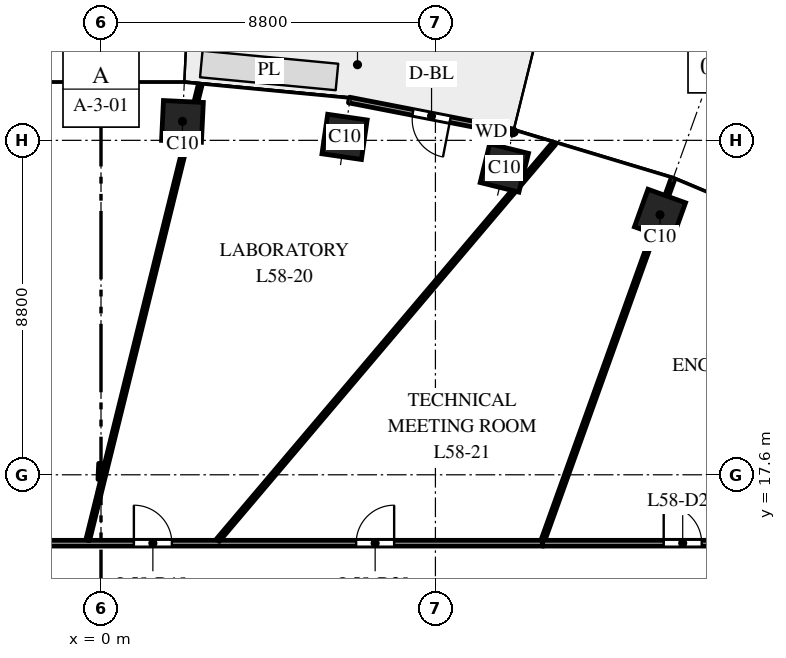
"""IFC4 building model, lengths in metres.
Left out: names, types, materials, properties, quantities, classifications, styles, units other than length and angle.
Written with IfcOpenShell. Run it as: python <this file> out.ifc"""

import sys

from ifc_helpers import new_model, si_unit, direction, frame, frame_2d, origin, origin_2d, place, context, subcontext, project, spatial, rectangle, extrude, element, fill, save


model = new_model("IFC4")
c1 = context("Model", 3, precision=1e-05, world=origin(), true_north=direction((0.0, 1.0)))
c2 = subcontext(c1, "Body", "Model", "MODEL_VIEW")
j1 = project(units=[si_unit("LENGTHUNIT", "METRE"), si_unit("PLANEANGLEUNIT", "RADIAN")], contexts=[c1])
p1 = place(None, origin())
s1 = spatial("IfcSite", under=j1, at=p1, CompositionType="ELEMENT")
p2 = place(p1, origin())
s2 = spatial("IfcBuilding", under=s1, at=p2, CompositionType="ELEMENT")
p3 = place(p2, frame((0.0, 0.0, 273.5)))
s3 = spatial("IfcBuildingStorey", under=s2, at=p3, CompositionType="ELEMENT", Elevation=273.5)
for number, where, z_axis, x_axis in (
    (1, (14.709, 24.441, 0.0), (0.0, 0.0, 1.0), (-0.941, 0.338, 0.0)),
    (2, (10.613, 25.674, 0.0), (0.0, 0.0, 1.0), (-0.971, 0.24, 0.0)),
    (3, (6.409, 26.491, 0.0), (0.0, 0.0, 1.0), (-0.99, 0.143, 0.0)),
    (4, (2.143, 26.898, 0.0), (0.0, 0.0, 1.0), (-0.999, 0.048, 0.0)),
):
    element("IfcColumn", number, at=place(p3, frame(where, z_axis=z_axis, x_axis=x_axis)), inside=s3, PredefinedType="COLUMN", context=c2, shape_type="SweptSolid", body=[
        extrude(rectangle(XDim=1.05, YDim=1.05, at=origin_2d()), origin(), (0.0, 0.0, 1.0), 4.0),
    ])
p4 = place(p3, frame((10.871, 26.617, 0.0), z_axis=(0.0, 0.0, 1.0), x_axis=(-0.981631174778, 0.190788460615, 0.0)))
e5 = element("IfcWall", 5, at=p4, inside=s3, PredefinedType="STANDARD", context=c2, shape_type="SweptSolid", body=[
    extrude(rectangle(XDim=4.426, YDim=0.15, at=frame_2d((2.213, 0.0))), origin(), (0.0, 0.0, 1.0), 3.7),
])
p5 = place(p4, frame((1.713, 0.0, 0.0)))
e6 = element("IfcOpeningElement", 6, at=p5, cuts=e5, PredefinedType="OPENING", context=c2, shape_type="SweptSolid", body=[
    extrude(rectangle(XDim=1.0, YDim=2.4, at=frame_2d((0.5, 1.2))), frame((0.0, 0.085, 0.0), z_axis=(0.0, -1.0, 0.0), x_axis=(1.0, 0.0, 0.0)), (0.0, 0.0, 1.0), 0.17),
])
p6 = place(p3, frame((-8.174, 15.8, 0.0), z_axis=(0.0, 0.0, 1.0), x_axis=(1.0, 0.0, 0.0)))
e7 = element("IfcWall", 7, at=p6, inside=s3, PredefinedType="PARTITIONING", context=c2, shape_type="SweptSolid", body=[
    extrude(rectangle(XDim=19.829, YDim=0.15, at=frame_2d((9.915, 0.0))), origin(), (0.0, 0.0, 1.0), 2.85),
])
p7 = place(p6, frame((3.422, 0.0, 0.0)))
e8 = element("IfcOpeningElement", 8, at=p7, cuts=e7, PredefinedType="OPENING", context=c2, shape_type="SweptSolid", body=[
    extrude(rectangle(XDim=1.0, YDim=2.1, at=frame_2d((0.5, 1.05))), frame((0.0, 0.085, 0.0), z_axis=(0.0, -1.0, 0.0), x_axis=(1.0, 0.0, 0.0)), (0.0, 0.0, 1.0), 0.17),
])
p8 = place(p6, frame((9.039, 0.0, 0.0)))
e9 = element("IfcOpeningElement", 9, at=p8, cuts=e7, PredefinedType="OPENING", context=c2, shape_type="SweptSolid", body=[
    extrude(rectangle(XDim=1.0, YDim=2.1, at=frame_2d((0.5, 1.05))), frame((0.0, 0.085, 0.0), z_axis=(0.0, -1.0, 0.0), x_axis=(1.0, 0.0, 0.0)), (0.0, 0.0, 1.0), 0.17),
])
p9 = place(p6, frame((14.888, 0.0, 0.0)))
e10 = element("IfcOpeningElement", 10, at=p9, cuts=e7, PredefinedType="OPENING", context=c2, shape_type="SweptSolid", body=[
    extrude(rectangle(XDim=1.0, YDim=2.1, at=frame_2d((0.5, 1.05))), frame((0.0, 0.085, 0.0), z_axis=(0.0, -1.0, 0.0), x_axis=(1.0, 0.0, 0.0)), (0.0, 0.0, 1.0), 0.17),
])
p10 = place(p3, frame((-0.35, 15.879, 0.0), z_axis=(0.0, 0.0, 1.0), x_axis=(0.240720113411, 0.970594573959, 0.0)))
e11 = element("IfcWall", 11, at=p10, inside=s3, PredefinedType="PARTITIONING", context=c2, shape_type="SweptSolid", body=[
    extrude(rectangle(XDim=1.234, YDim=0.1, at=frame_2d((0.617, 0.0))), origin(), (0.0, 0.0, 1.0), 3.7),
])
p11 = place(p3, frame((-0.049, 17.097, 0.0), z_axis=(0.0, 0.0, 1.0), x_axis=(0.239793112589, 0.970824012453, 0.0)))
e12 = element("IfcWall", 12, at=p11, inside=s3, PredefinedType="PARTITIONING", context=c2, shape_type="SweptSolid", body=[
    extrude(rectangle(XDim=11.084, YDim=0.1, at=frame_2d((5.542, 0.0))), origin(), (0.0, 0.0, 1.0), 3.0),
])
p12 = place(p3, frame((-0.03, 17.477, 0.0), z_axis=(0.0, 0.0, 1.0), x_axis=(0.045197383952, 0.998978076078, 0.0)))
e13 = element("IfcWall", 13, at=p12, inside=s3, PredefinedType="PARTITIONING", context=c2, shape_type="SweptSolid", body=[
    extrude(rectangle(XDim=0.421, YDim=0.1, at=frame_2d((0.211, 0.0))), origin(), (0.0, 0.0, 1.0), 3.7),
])
p13 = place(p3, frame((3.075, 15.878, 0.0), z_axis=(0.0, 0.0, 1.0), x_axis=(0.64645132614, 0.762955229966, 0.0)))
e14 = element("IfcWall", 14, at=p13, inside=s3, PredefinedType="PARTITIONING", context=c2, shape_type="SweptSolid", body=[
    extrude(rectangle(XDim=13.69, YDim=0.1, at=frame_2d((6.845, 0.0))), origin(), (0.0, 0.0, 1.0), 2.85),
])
p14 = place(p3, frame((11.629, 15.875, 0.0), z_axis=(0.0, 0.0, 1.0), x_axis=(0.338394316696, 0.94100440298, 0.0)))
e15 = element("IfcWall", 15, at=p14, inside=s3, PredefinedType="PARTITIONING", context=c2, shape_type="SweptSolid", body=[
    extrude(rectangle(XDim=10.104, YDim=0.1, at=frame_2d((5.052, 0.0))), origin(), (0.0, 0.0, 1.0), 2.85),
])
p15 = place(p3, frame((11.614, 15.8, 0.0), z_axis=(0.0, 0.0, 1.0), x_axis=(1.0, 0.0, 0.0)))
e16 = element("IfcWall", 16, at=p15, inside=s3, PredefinedType="PARTITIONING", context=c2, shape_type="SweptSolid", body=[
    extrude(rectangle(XDim=16.386, YDim=0.15, at=frame_2d((8.193, 0.0))), origin(), (0.0, 0.0, 1.0), 3.0),
])
p16 = place(p15, frame((3.193, 0.0, 0.0)))
e17 = element("IfcOpeningElement", 17, at=p16, cuts=e16, PredefinedType="OPENING", context=c2, shape_type="SweptSolid", body=[
    extrude(rectangle(XDim=1.0, YDim=2.1, at=frame_2d((0.5, 1.05))), frame((0.0, 0.085, 0.0), z_axis=(0.0, -1.0, 0.0), x_axis=(1.0, 0.0, 0.0)), (0.0, 0.0, 1.0), 0.17),
])
p17 = place(p15, frame((11.486, 0.0, 0.0)))
e18 = element("IfcOpeningElement", 18, at=p17, cuts=e16, PredefinedType="OPENING", context=c2, shape_type="SweptSolid", body=[
    extrude(rectangle(XDim=1.0, YDim=2.1, at=frame_2d((0.5, 1.05))), frame((0.0, 0.085, 0.0), z_axis=(0.0, -1.0, 0.0), x_axis=(1.0, 0.0, 0.0)), (0.0, 0.0, 1.0), 0.17),
])
p18 = place(p5, origin())
e19 = element("IfcDoor", 19, at=p18, inside=s3, OperationType="SINGLE_SWING_LEFT", PredefinedType="DOOR", context=c2, shape_type="SweptSolid", body=[
    extrude(rectangle(XDim=1.0, YDim=2.4, at=frame_2d((0.5, 1.2))), frame((0.0, 0.025, 0.0), z_axis=(0.0, -1.0, 0.0), x_axis=(1.0, 0.0, 0.0)), (0.0, 0.0, 1.0), 0.05),
])
fill(e6, e19)
p19 = place(p8, origin())
e20 = element("IfcDoor", 20, at=p19, inside=s3, OperationType="SINGLE_SWING_LEFT", PredefinedType="DOOR", context=c2, shape_type="SweptSolid", body=[
    extrude(rectangle(XDim=1.0, YDim=2.1, at=frame_2d((0.5, 1.05))), frame((0.0, 0.025, 0.0), z_axis=(0.0, -1.0, 0.0), x_axis=(1.0, 0.0, 0.0)), (0.0, 0.0, 1.0), 0.05),
])
fill(e9, e20)
p20 = place(p9, origin())
e21 = element("IfcDoor", 21, at=p20, inside=s3, OperationType="SINGLE_SWING_RIGHT", PredefinedType="DOOR", context=c2, shape_type="SweptSolid", body=[
    extrude(rectangle(XDim=1.0, YDim=2.1, at=frame_2d((0.5, 1.05))), frame((0.0, 0.025, 0.0), z_axis=(0.0, -1.0, 0.0), x_axis=(1.0, 0.0, 0.0)), (0.0, 0.0, 1.0), 0.05),
])
fill(e10, e21)
p21 = place(p16, origin())
e22 = element("IfcDoor", 22, at=p21, inside=s3, OperationType="SINGLE_SWING_LEFT", PredefinedType="DOOR", context=c2, shape_type="SweptSolid", body=[
    extrude(rectangle(XDim=1.0, YDim=2.1, at=frame_2d((0.5, 1.05))), frame((0.0, 0.025, 0.0), z_axis=(0.0, -1.0, 0.0), x_axis=(1.0, 0.0, 0.0)), (0.0, 0.0, 1.0), 0.05),
])
fill(e17, e22)
save(model, sys.argv[1])
